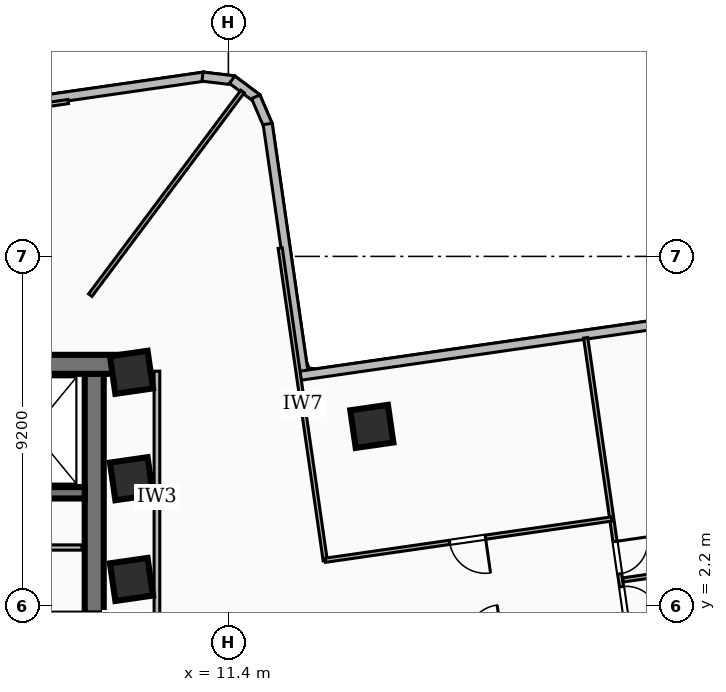
"""IFC4 building model, lengths in metres.
Left out: names, types, materials, properties, quantities, classifications, styles, units other than length and angle.
Written with IfcOpenShell. Run it as: python <this file> out.ifc"""

import sys

from ifc_helpers import new_model, si_unit, direction, frame, frame_2d, origin, origin_2d, place, context, subcontext, project, spatial, rectangle, extrude, element, fill, save


model = new_model("IFC4")
c1 = context("Model", 3, precision=1e-05, world=origin(), true_north=direction((0.0, 1.0)))
c2 = subcontext(c1, "Body", "Model", "MODEL_VIEW")
j1 = project(units=[si_unit("LENGTHUNIT", "METRE"), si_unit("PLANEANGLEUNIT", "RADIAN")], contexts=[c1])
p1 = place(None, origin())
s1 = spatial("IfcSite", under=j1, at=p1, CompositionType="ELEMENT")
p2 = place(p1, origin())
s2 = spatial("IfcBuilding", under=s1, at=p2, CompositionType="ELEMENT")
p3 = place(p2, frame((0.0, 0.0, 85.68)))
s3 = spatial("IfcBuildingStorey", under=s2, at=p3, CompositionType="ELEMENT", Elevation=85.68)
p4 = place(p3, frame((-8.78, 8.56, 0.0), z_axis=(0.0, 0.0, 1.0), x_axis=(1.0, 0.0, 0.0)))
e1 = element("IfcWall", 1, at=p4, inside=s3, PredefinedType="SHEAR", context=c2, shape_type="SweptSolid", body=[
    extrude(rectangle(XDim=17.56, YDim=0.5, at=frame_2d((8.78, 0.0))), origin(), (0.0, 0.0, 1.0), 3.34),
])
p5 = place(p3, frame((7.87, 8.31, 0.0), z_axis=(0.0, 0.0, 1.0), x_axis=(0.0, -1.0, 0.0)))
e2 = element("IfcWall", 2, at=p5, inside=s3, PredefinedType="SHEAR", context=c2, shape_type="SweptSolid", body=[
    extrude(rectangle(XDim=6.31, YDim=0.5, at=frame_2d((3.155, 0.0))), origin(), (0.0, 0.0, 1.0), 3.34),
])
p6 = place(p3, frame((7.62, 5.18, 0.0), z_axis=(0.0, 0.0, 1.0), x_axis=(-1.0, 0.0, 0.0)))
e3 = element("IfcWall", 3, at=p6, inside=s3, PredefinedType="SOLIDWALL", context=c2, shape_type="SweptSolid", body=[
    extrude(rectangle(XDim=15.24, YDim=0.3, at=frame_2d((7.62, 0.0))), origin(), (0.0, 0.0, 1.0), 3.34),
])
p7 = place(p6, frame((5.77, 0.0, 0.0)))
e4 = element("IfcOpeningElement", 4, at=p7, cuts=e3, PredefinedType="OPENING", context=c2, shape_type="SweptSolid", body=[
    extrude(rectangle(XDim=1.1, YDim=2.15, at=frame_2d((0.55, 1.075))), frame((0.0, 0.16, 0.0), z_axis=(0.0, -1.0, 0.0), x_axis=(1.0, 0.0, 0.0)), (0.0, 0.0, 1.0), 0.32),
])
p8 = place(p6, frame((2.97, 0.0, 0.0)))
e5 = element("IfcOpeningElement", 5, at=p8, cuts=e3, PredefinedType="OPENING", context=c2, shape_type="SweptSolid", body=[
    extrude(rectangle(XDim=1.1, YDim=2.15, at=frame_2d((0.55, 1.075))), frame((0.0, 0.16, 0.0), z_axis=(0.0, -1.0, 0.0), x_axis=(1.0, 0.0, 0.0)), (0.0, 0.0, 1.0), 0.32),
])
p9 = place(p6, frame((7.97, 0.0, 0.0)))
e6 = element("IfcOpeningElement", 6, at=p9, cuts=e3, PredefinedType="OPENING", context=c2, shape_type="SweptSolid", body=[
    extrude(rectangle(XDim=1.0, YDim=2.1, at=frame_2d((0.5, 1.05))), frame((0.0, 0.16, 0.0), z_axis=(0.0, -1.0, 0.0), x_axis=(1.0, 0.0, 0.0)), (0.0, 0.0, 1.0), 0.32),
])
for number, where, z_axis, x_axis in (
    (7, (8.85, 2.9, 0.0), (0.0, 0.0, 1.0), (0.99, 0.143, 0.0)),
    (8, (8.85, 5.55, 0.0), (0.0, 0.0, 1.0), (0.99, 0.143, 0.0)),
    (9, (8.85, 8.35, 0.0), (0.0, 0.0, 1.0), (0.99, 0.143, 0.0)),
    (10, (15.175, 6.927, 0.0), (0.0, 0.0, 1.0), (0.99, 0.143, 0.0)),
):
    element("IfcColumn", number, at=place(p3, frame(where, z_axis=z_axis, x_axis=x_axis)), inside=s3, PredefinedType="COLUMN", context=c2, shape_type="SweptSolid", body=[
        extrude(rectangle(XDim=1.0, YDim=1.0, at=origin_2d()), origin(), (0.0, 0.0, 1.0), 3.6),
    ])
p10 = place(p3, frame((4.419, 15.215, 0.0), z_axis=(0.0, 0.0, 1.0), x_axis=(0.989755260243, 0.14277438433, 0.0)))
e11 = element("IfcWall", 11, at=p10, inside=s3, PredefinedType="SOLIDWALL", context=c2, shape_type="SweptSolid", body=[
    extrude(rectangle(XDim=6.416, YDim=0.24, at=frame_2d((3.208, 0.0))), origin(), (0.0, 0.0, 1.0), 2.486),
])
p11 = place(p3, frame((10.719, 16.13, 0.0), z_axis=(0.0, 0.0, 1.0), x_axis=(0.993031739051, -0.117847211411, 0.0)))
e12 = element("IfcWall", 12, at=p11, inside=s3, PredefinedType="SOLIDWALL", context=c2, shape_type="SweptSolid", body=[
    extrude(rectangle(XDim=0.831, YDim=0.24, at=frame_2d((0.416, 0.0))), origin(), (0.0, 0.0, 1.0), 3.34),
])
p12 = place(p3, frame((11.499, 16.05, 0.0), z_axis=(0.0, 0.0, 1.0), x_axis=(0.800072018724, -0.599903963027, 0.0)))
e13 = element("IfcWall", 13, at=p12, inside=s3, PredefinedType="SOLIDWALL", context=c2, shape_type="SweptSolid", body=[
    extrude(rectangle(XDim=0.813, YDim=0.24, at=frame_2d((0.407, 0.0))), origin(), (0.0, 0.0, 1.0), 3.34),
])
p13 = place(p3, frame((12.12, 15.6, 0.0), z_axis=(0.0, 0.0, 1.0), x_axis=(0.394735025731, -0.918795004047, 0.0)))
e14 = element("IfcWall", 14, at=p13, inside=s3, PredefinedType="SOLIDWALL", context=c2, shape_type="SweptSolid", body=[
    extrude(rectangle(XDim=0.831, YDim=0.24, at=frame_2d((0.415, 0.0))), origin(), (0.0, 0.0, 1.0), 3.34),
])
p14 = place(p3, frame((12.434, 14.885, 0.0), z_axis=(0.0, 0.0, 1.0), x_axis=(0.142692500085, -0.989767068769, 0.0)))
e15 = element("IfcWall", 15, at=p14, inside=s3, PredefinedType="SOLIDWALL", context=c2, shape_type="SweptSolid", body=[
    extrude(rectangle(XDim=6.775, YDim=0.24, at=frame_2d((3.388, 0.0))), origin(), (0.0, 0.0, 1.0), 3.34),
])
p15 = place(p3, frame((13.292, 8.26, 0.0), z_axis=(0.0, 0.0, 1.0), x_axis=(0.989770197797, 0.142670794326, 0.0)))
e16 = element("IfcWall", 16, at=p15, inside=s3, PredefinedType="SOLIDWALL", context=c2, shape_type="SweptSolid", body=[
    extrude(rectangle(XDim=16.275, YDim=0.24, at=frame_2d((8.138, 0.0))), origin(), (0.0, 0.0, 1.0), 3.34),
])
p16 = place(p15, frame((13.375, 0.0, 0.85)))
e17 = element("IfcOpeningElement", 17, at=p16, cuts=e16, PredefinedType="OPENING", context=c2, shape_type="SweptSolid", body=[
    extrude(rectangle(XDim=1.8, YDim=2.0, at=frame_2d((0.9, 1.0))), frame((0.0, 0.13, 0.0), z_axis=(0.0, -1.0, 0.0), x_axis=(1.0, 0.0, 0.0)), (0.0, 0.0, 1.0), 0.26),
])
p17 = place(p3, frame((2.9, 3.74, 0.0), z_axis=(0.0, 0.0, 1.0), x_axis=(1.0, 0.0, 0.0)))
e18 = element("IfcWall", 18, at=p17, inside=s3, PredefinedType="PARTITIONING", context=c2, shape_type="SweptSolid", body=[
    extrude(rectangle(XDim=4.65, YDim=0.138, at=frame_2d((2.325, 0.0))), origin(), (0.0, 0.0, 1.0), 3.34),
])
p18 = place(p3, frame((9.52, 1.75, 0.0), z_axis=(0.0, 0.0, 1.0), x_axis=(0.0, 1.0, 0.0)))
e19 = element("IfcWall", 19, at=p18, inside=s3, PredefinedType="PARTITIONING", context=c2, shape_type="SweptSolid", body=[
    extrude(rectangle(XDim=6.63, YDim=0.15, at=frame_2d((3.315, 0.0))), origin(), (0.0, 0.0, 1.0), 2.486),
])
p19 = place(p3, frame((7.766, 10.38, 0.0), z_axis=(0.0, 0.0, 1.0), x_axis=(0.598966195252, 0.800774310867, 0.0)))
e20 = element("IfcWall", 20, at=p19, inside=s3, PredefinedType="PARTITIONING", context=c2, shape_type="SweptSolid", body=[
    extrude(rectangle(XDim=6.691, YDim=0.11, at=frame_2d((3.346, 0.0))), origin(), (0.0, 0.0, 1.0), 3.34),
])
p20 = place(p3, frame((13.949, 3.394, 0.0), z_axis=(0.0, 0.0, 1.0), x_axis=(-0.142725091033, 0.989762369657, 0.0)))
e21 = element("IfcWall", 21, at=p20, inside=s3, PredefinedType="PARTITIONING", context=c2, shape_type="SweptSolid", body=[
    extrude(rectangle(XDim=8.31, YDim=0.11, at=frame_2d((4.155, 0.0))), origin(), (0.0, 0.0, 1.0), 2.486),
])
p21 = place(p3, frame((21.489, 4.491, 0.0), z_axis=(0.0, 0.0, 1.0), x_axis=(-0.989774445133, -0.142641325577, 0.0)))
e22 = element("IfcWall", 22, at=p21, inside=s3, PredefinedType="PARTITIONING", context=c2, shape_type="SweptSolid", body=[
    extrude(rectangle(XDim=7.62, YDim=0.11, at=frame_2d((3.81, 0.0))), origin(), (0.0, 0.0, 1.0), 3.34),
])
p22 = place(p21, frame((3.36, 0.0, 0.0)))
e23 = element("IfcOpeningElement", 23, at=p22, cuts=e22, PredefinedType="OPENING", context=c2, shape_type="SweptSolid", body=[
    extrude(rectangle(XDim=0.95, YDim=2.08, at=frame_2d((0.475, 1.04))), frame((0.0, 0.065, 0.0), z_axis=(0.0, -1.0, 0.0), x_axis=(1.0, 0.0, 0.0)), (0.0, 0.0, 1.0), 0.13),
])
p23 = place(p3, frame((21.781, 2.886, 0.0), z_axis=(0.0, 0.0, 1.0), x_axis=(0.989773870341, 0.142645313942, 0.0)))
e24 = element("IfcWall", 24, at=p23, inside=s3, PredefinedType="PARTITIONING", context=c2, shape_type="SweptSolid", body=[
    extrude(rectangle(XDim=10.024, YDim=0.11, at=frame_2d((5.012, 0.0))), origin(), (0.0, 0.0, 1.0), 2.832),
])
p24 = place(p3, frame((20.802, 9.257, 0.0), z_axis=(0.0, 0.0, 1.0), x_axis=(0.142667743944, -0.98977063749, 0.0)))
e25 = element("IfcWall", 25, at=p24, inside=s3, PredefinedType="PARTITIONING", context=c2, shape_type="SweptSolid", body=[
    extrude(rectangle(XDim=12.75, YDim=0.11, at=frame_2d((6.375, 0.0))), origin(), (0.0, 0.0, 1.0), 2.486),
])
p25 = place(p24, frame((6.615, 0.0, 0.0)))
e26 = element("IfcOpeningElement", 26, at=p25, cuts=e25, PredefinedType="OPENING", context=c2, shape_type="SweptSolid", body=[
    extrude(rectangle(XDim=0.86, YDim=2.04, at=frame_2d((0.43, 1.02))), frame((0.0, 0.065, 0.0), z_axis=(0.0, -1.0, 0.0), x_axis=(1.0, 0.0, 0.0)), (0.0, 0.0, 1.0), 0.13),
])
p26 = place(p24, frame((5.415, 0.0, 0.0)))
e27 = element("IfcOpeningElement", 27, at=p26, cuts=e25, PredefinedType="OPENING", context=c2, shape_type="SweptSolid", body=[
    extrude(rectangle(XDim=0.86, YDim=2.04, at=frame_2d((0.43, 1.02))), frame((0.0, 0.065, 0.0), z_axis=(0.0, -1.0, 0.0), x_axis=(1.0, 0.0, 0.0)), (0.0, 0.0, 1.0), 0.13),
])
p27 = place(p3, frame((7.186, 15.474, 0.0), z_axis=(0.0, 0.0, 1.0), x_axis=(-0.989754461648, -0.142779920322, 0.0)))
e28 = element("IfcWall", 28, at=p27, inside=s3, PredefinedType="PARTITIONING", context=c2, shape_type="SweptSolid", body=[
    extrude(rectangle(XDim=7.949, YDim=0.11, at=frame_2d((3.975, 0.0))), origin(), (0.0, 0.0, 1.0), 2.486),
])
p28 = place(p22, origin())
e29 = element("IfcDoor", 29, at=p28, inside=s3, OperationType="SINGLE_SWING_LEFT", PredefinedType="DOOR", context=c2, shape_type="SweptSolid", body=[
    extrude(rectangle(XDim=0.95, YDim=2.08, at=frame_2d((0.475, 1.04))), frame((0.0, 0.025, 0.0), z_axis=(0.0, -1.0, 0.0), x_axis=(1.0, 0.0, 0.0)), (0.0, 0.0, 1.0), 0.05),
])
fill(e23, e29)
p29 = place(p25, origin())
e30 = element("IfcDoor", 30, at=p29, inside=s3, OperationType="SINGLE_SWING_RIGHT", PredefinedType="DOOR", context=c2, shape_type="SweptSolid", body=[
    extrude(rectangle(XDim=0.86, YDim=2.04, at=frame_2d((0.43, 1.02))), frame((0.0, 0.025, 0.0), z_axis=(0.0, -1.0, 0.0), x_axis=(1.0, 0.0, 0.0)), (0.0, 0.0, 1.0), 0.05),
])
fill(e26, e30)
p30 = place(p26, origin())
e31 = element("IfcDoor", 31, at=p30, inside=s3, OperationType="SINGLE_SWING_LEFT", PredefinedType="DOOR", context=c2, shape_type="SweptSolid", body=[
    extrude(rectangle(XDim=0.86, YDim=2.04, at=frame_2d((0.43, 1.02))), frame((0.0, 0.025, 0.0), z_axis=(0.0, -1.0, 0.0), x_axis=(1.0, 0.0, 0.0)), (0.0, 0.0, 1.0), 0.05),
])
fill(e27, e31)
save(model, sys.argv[1])
